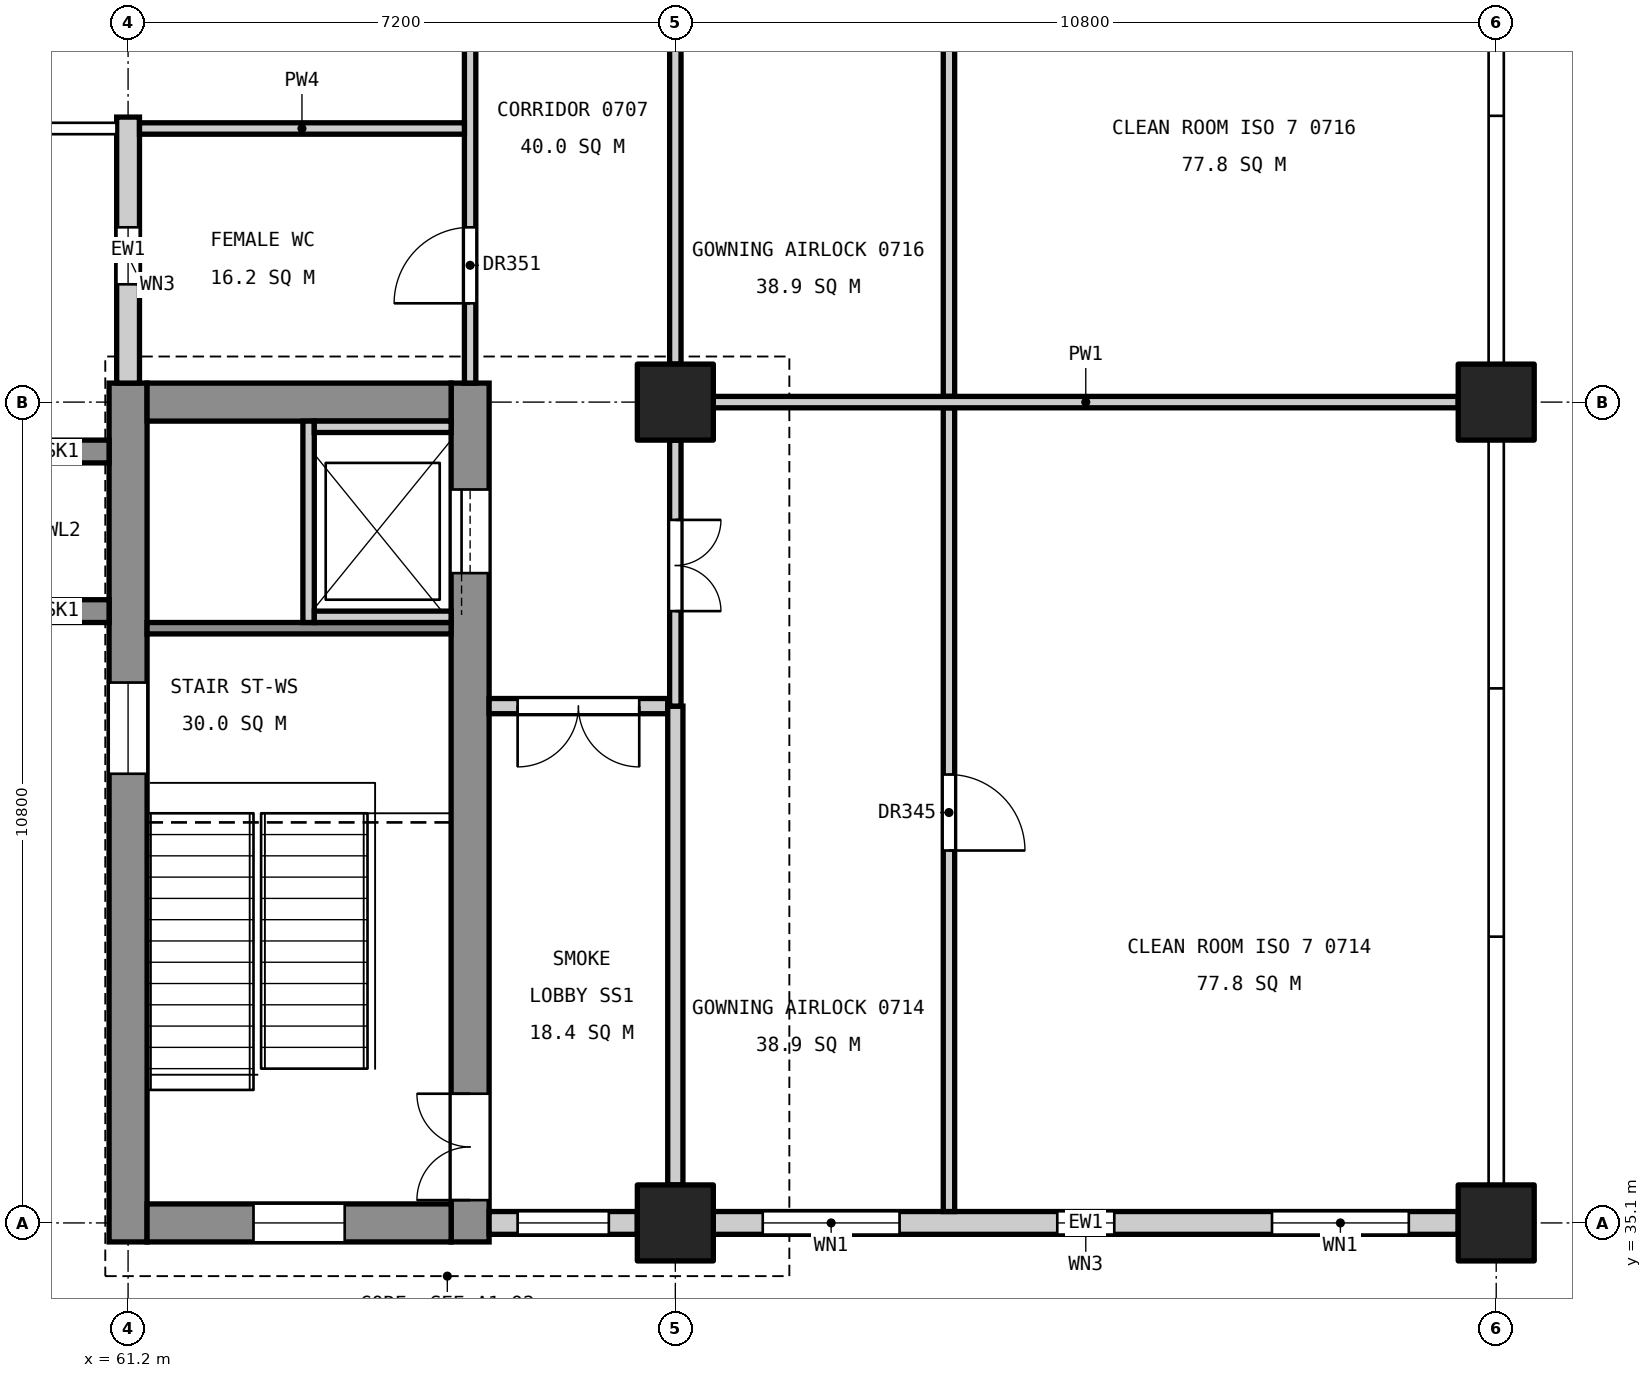
"""IFC4 building model, lengths in metres.
Left out: names, types, materials, properties, quantities, classifications, styles, units other than length and angle.
Written with IfcOpenShell. Run it as: python <this file> out.ifc"""

import sys

from ifc_helpers import new_model, si_unit, direction, frame, frame_2d, origin, origin_2d, place, context, subcontext, project, spatial, rectangle, extrude, element, fill, save


model = new_model("IFC4")
c1 = context("Model", 3, precision=1e-05, world=origin(), true_north=direction((0.0, 1.0)))
c2 = subcontext(c1, "Body", "Model", "MODEL_VIEW")
j1 = project(units=[si_unit("LENGTHUNIT", "METRE"), si_unit("PLANEANGLEUNIT", "RADIAN")], contexts=[c1])
p1 = place(None, origin())
s1 = spatial("IfcSite", under=j1, at=p1, CompositionType="ELEMENT")
p2 = place(p1, origin())
s2 = spatial("IfcBuilding", under=s1, at=p2, CompositionType="ELEMENT")
p3 = place(p2, frame((0.0, 0.0, 36.6)))
s3 = spatial("IfcBuildingStorey", under=s2, at=p3, CompositionType="ELEMENT", Elevation=36.6)
for number, where, z_axis, x_axis in (
    (1, (68.4, 35.1, 0.0), (0.0, 0.0, 1.0), (1.0, 0.0, 0.0)),
    (2, (68.4, 45.9, 0.0), (0.0, 0.0, 1.0), (1.0, 0.0, 0.0)),
    (3, (79.2, 35.1, 0.0), (0.0, 0.0, 1.0), (1.0, 0.0, 0.0)),
    (4, (79.2, 45.9, 0.0), (0.0, 0.0, 1.0), (1.0, 0.0, 0.0)),
):
    element("IfcColumn", number, at=place(p3, frame(where, z_axis=z_axis, x_axis=x_axis)), inside=s3, PredefinedType="COLUMN", context=c2, shape_type="SweptSolid", body=[
        extrude(rectangle(XDim=1.0, YDim=1.0, at=origin_2d()), origin(), (0.0, 0.0, 1.0), 4.8),
    ])
p4 = place(p3, frame((61.2, 34.85, 0.0), z_axis=(0.0, 0.0, 1.0), x_axis=(0.0, 1.0, 0.0)))
e5 = element("IfcWall", 5, at=p4, inside=s3, PredefinedType="SHEAR", context=c2, shape_type="SweptSolid", body=[
    extrude(rectangle(XDim=11.3, YDim=0.5, at=frame_2d((5.65, 0.0))), origin(), (0.0, 0.0, 1.0), 4.55),
])
p5 = place(p4, frame((6.16, 0.0, 3.4)))
e6 = element("IfcOpeningElement", 6, at=p5, cuts=e5, PredefinedType="OPENING", context=c2, shape_type="SweptSolid", body=[
    extrude(rectangle(XDim=1.2, YDim=0.9, at=frame_2d((0.6, 0.45))), frame((0.0, 0.26, 0.0), z_axis=(0.0, -1.0, 0.0), x_axis=(1.0, 0.0, 0.0)), (0.0, 0.0, 1.0), 0.52),
])
p6 = place(p3, frame((65.7, 34.85, 0.0), z_axis=(0.0, 0.0, 1.0), x_axis=(0.0, 1.0, 0.0)))
e7 = element("IfcWall", 7, at=p6, inside=s3, PredefinedType="SHEAR", context=c2, shape_type="SweptSolid", body=[
    extrude(rectangle(XDim=11.3, YDim=0.5, at=frame_2d((5.65, 0.0))), origin(), (0.0, 0.0, 1.0), 4.55),
])
p7 = place(p6, frame((0.55, 0.0, 0.0)))
e8 = element("IfcOpeningElement", 8, at=p7, cuts=e7, PredefinedType="OPENING", context=c2, shape_type="SweptSolid", body=[
    extrude(rectangle(XDim=1.4, YDim=2.1, at=frame_2d((0.7, 1.05))), frame((0.0, 0.26, 0.0), z_axis=(0.0, -1.0, 0.0), x_axis=(1.0, 0.0, 0.0)), (0.0, 0.0, 1.0), 0.52),
])
p8 = place(p6, frame((8.8, 0.0, 0.0)))
e9 = element("IfcOpeningElement", 9, at=p8, cuts=e7, PredefinedType="OPENING", context=c2, shape_type="SweptSolid", body=[
    extrude(rectangle(XDim=1.1, YDim=2.1, at=frame_2d((0.55, 1.05))), frame((0.0, 0.26, 0.0), z_axis=(0.0, -1.0, 0.0), x_axis=(1.0, 0.0, 0.0)), (0.0, 0.0, 1.0), 0.52),
])
p9 = place(p3, frame((61.45, 35.1, 0.0), z_axis=(0.0, 0.0, 1.0), x_axis=(1.0, 0.0, 0.0)))
e10 = element("IfcWall", 10, at=p9, inside=s3, PredefinedType="SHEAR", context=c2, shape_type="SweptSolid", body=[
    extrude(rectangle(XDim=4.0, YDim=0.5, at=frame_2d((2.0, 0.0))), origin(), (0.0, 0.0, 1.0), 4.55),
])
p10 = place(p9, frame((1.4, 0.0, 3.4)))
e11 = element("IfcOpeningElement", 11, at=p10, cuts=e10, PredefinedType="OPENING", context=c2, shape_type="SweptSolid", body=[
    extrude(rectangle(XDim=1.2, YDim=0.9, at=frame_2d((0.6, 0.45))), frame((0.0, 0.26, 0.0), z_axis=(0.0, -1.0, 0.0), x_axis=(1.0, 0.0, 0.0)), (0.0, 0.0, 1.0), 0.52),
])
p11 = place(p3, frame((61.45, 45.9, 0.0), z_axis=(0.0, 0.0, 1.0), x_axis=(1.0, 0.0, 0.0)))
e12 = element("IfcWall", 12, at=p11, inside=s3, PredefinedType="SHEAR", context=c2, shape_type="SweptSolid", body=[
    extrude(rectangle(XDim=4.0, YDim=0.5, at=frame_2d((2.0, 0.0))), origin(), (0.0, 0.0, 1.0), 4.55),
])
for number, where, z_axis, x_axis in (
    (13, (60.95, 43.15, 0.0), (0.0, 0.0, 1.0), (-1.0, 0.0, 0.0)),
    (14, (60.95, 45.25, 0.0), (0.0, 0.0, 1.0), (-1.0, 0.0, 0.0)),
):
    element("IfcWall", number, at=place(p3, frame(where, z_axis=z_axis, x_axis=x_axis)), inside=s3, PredefinedType="SHEAR", context=c2, shape_type="SweptSolid", body=[
        extrude(rectangle(XDim=1.25, YDim=0.3, at=frame_2d((0.625, 0.0))), origin(), (0.0, 0.0, 1.0), 4.8),
    ])
p12 = place(p3, frame((61.45, 42.925, 0.0), z_axis=(0.0, 0.0, 1.0), x_axis=(1.0, 0.0, 0.0)))
e15 = element("IfcWall", 15, at=p12, inside=s3, PredefinedType="SOLIDWALL", context=c2, shape_type="SweptSolid", body=[
    extrude(rectangle(XDim=4.0, YDim=0.15, at=frame_2d((2.0, 0.0))), origin(), (0.0, 0.0, 1.0), 4.55),
])
p13 = place(p3, frame((63.575, 43.0, 0.0), z_axis=(0.0, 0.0, 1.0), x_axis=(0.0, 1.0, 0.0)))
e16 = element("IfcWall", 16, at=p13, inside=s3, PredefinedType="SOLIDWALL", context=c2, shape_type="SweptSolid", body=[
    extrude(rectangle(XDim=2.65, YDim=0.15, at=frame_2d((1.325, 0.0))), origin(), (0.0, 0.0, 1.0), 4.8),
])
for number, where, z_axis, x_axis in (
    (17, (63.65, 43.075, 0.0), (0.0, 0.0, 1.0), (1.0, 0.0, 0.0)),
    (18, (63.65, 45.575, 0.0), (0.0, 0.0, 1.0), (1.0, 0.0, 0.0)),
):
    element("IfcWall", number, at=place(p3, frame(where, z_axis=z_axis, x_axis=x_axis)), inside=s3, PredefinedType="SOLIDWALL", context=c2, shape_type="SweptSolid", body=[
        extrude(rectangle(XDim=1.8, YDim=0.15, at=frame_2d((0.9, 0.0))), origin(), (0.0, 0.0, 1.0), 4.8),
    ])
p14 = place(p3, frame((61.2, 46.15, 0.0), z_axis=(0.0, 0.0, 1.0), x_axis=(0.0, 1.0, 0.0)))
e19 = element("IfcWall", 19, at=p14, inside=s3, PredefinedType="STANDARD", context=c2, shape_type="SweptSolid", body=[
    extrude(rectangle(XDim=3.5, YDim=0.3, at=frame_2d((1.75, 0.0))), origin(), (0.0, 0.0, 1.0), 3.65),
])
p15 = place(p14, frame((1.3, 0.0, 0.8)))
e20 = element("IfcOpeningElement", 20, at=p15, cuts=e19, PredefinedType="OPENING", context=c2, shape_type="SweptSolid", body=[
    extrude(rectangle(XDim=0.75, YDim=1.2, at=frame_2d((0.375, 0.6))), frame((0.0, 0.16, 0.0), z_axis=(0.0, -1.0, 0.0), x_axis=(1.0, 0.0, 0.0)), (0.0, 0.0, 1.0), 0.32),
])
p16 = place(p3, frame((65.95, 35.1, 0.0), z_axis=(0.0, 0.0, 1.0), x_axis=(1.0, 0.0, 0.0)))
e21 = element("IfcWall", 21, at=p16, inside=s3, PredefinedType="STANDARD", context=c2, shape_type="SweptSolid", body=[
    extrude(rectangle(XDim=1.95, YDim=0.3, at=frame_2d((0.975, 0.0))), origin(), (0.0, 0.0, 1.0), 3.85),
])
p17 = place(p16, frame((0.375, 0.0, 0.9)))
e22 = element("IfcOpeningElement", 22, at=p17, cuts=e21, PredefinedType="OPENING", context=c2, shape_type="SweptSolid", body=[
    extrude(rectangle(XDim=1.2, YDim=2.4, at=frame_2d((0.6, 1.2))), frame((0.0, 0.16, 0.0), z_axis=(0.0, -1.0, 0.0), x_axis=(1.0, 0.0, 0.0)), (0.0, 0.0, 1.0), 0.32),
])
p18 = place(p3, frame((68.9, 35.1, 0.0), z_axis=(0.0, 0.0, 1.0), x_axis=(1.0, 0.0, 0.0)))
e23 = element("IfcWall", 23, at=p18, inside=s3, PredefinedType="STANDARD", context=c2, shape_type="SweptSolid", body=[
    extrude(rectangle(XDim=9.8, YDim=0.3, at=frame_2d((4.9, 0.0))), origin(), (0.0, 0.0, 1.0), 3.85),
])
p19 = place(p18, frame((0.65, 0.0, 0.9)))
e24 = element("IfcOpeningElement", 24, at=p19, cuts=e23, PredefinedType="OPENING", context=c2, shape_type="SweptSolid", body=[
    extrude(rectangle(XDim=1.8, YDim=2.4, at=frame_2d((0.9, 1.2))), frame((0.0, 0.16, 0.0), z_axis=(0.0, -1.0, 0.0), x_axis=(1.0, 0.0, 0.0)), (0.0, 0.0, 1.0), 0.32),
])
p20 = place(p18, frame((4.525, 0.0, 0.8)))
e25 = element("IfcOpeningElement", 25, at=p20, cuts=e23, PredefinedType="OPENING", context=c2, shape_type="SweptSolid", body=[
    extrude(rectangle(XDim=0.75, YDim=1.2, at=frame_2d((0.375, 0.6))), frame((0.0, 0.16, 0.0), z_axis=(0.0, -1.0, 0.0), x_axis=(1.0, 0.0, 0.0)), (0.0, 0.0, 1.0), 0.32),
])
p21 = place(p18, frame((7.35, 0.0, 0.9)))
e26 = element("IfcOpeningElement", 26, at=p21, cuts=e23, PredefinedType="OPENING", context=c2, shape_type="SweptSolid", body=[
    extrude(rectangle(XDim=1.8, YDim=2.4, at=frame_2d((0.9, 1.2))), frame((0.0, 0.16, 0.0), z_axis=(0.0, -1.0, 0.0), x_axis=(1.0, 0.0, 0.0)), (0.0, 0.0, 1.0), 0.32),
])
p22 = place(p3, frame((65.7, 46.15, 0.0), z_axis=(0.0, 0.0, 1.0), x_axis=(0.0, 1.0, 0.0)))
e27 = element("IfcWall", 27, at=p22, inside=s3, PredefinedType="PARTITIONING", context=c2, shape_type="SweptSolid", body=[
    extrude(rectangle(XDim=10.4, YDim=0.15, at=frame_2d((5.2, 0.0))), origin(), (0.0, 0.0, 1.0), 3.55),
])
p23 = place(p22, frame((1.05, 0.0, 0.0)))
e28 = element("IfcOpeningElement", 28, at=p23, cuts=e27, PredefinedType="OPENING", context=c2, shape_type="SweptSolid", body=[
    extrude(rectangle(XDim=1.0, YDim=2.1, at=frame_2d((0.5, 1.05))), frame((0.0, 0.085, 0.0), z_axis=(0.0, -1.0, 0.0), x_axis=(1.0, 0.0, 0.0)), (0.0, 0.0, 1.0), 0.17),
])
p24 = place(p22, frame((6.45, 0.0, 0.0)))
e29 = element("IfcOpeningElement", 29, at=p24, cuts=e27, PredefinedType="OPENING", context=c2, shape_type="SweptSolid", body=[
    extrude(rectangle(XDim=1.0, YDim=2.1, at=frame_2d((0.5, 1.05))), frame((0.0, 0.085, 0.0), z_axis=(0.0, -1.0, 0.0), x_axis=(1.0, 0.0, 0.0)), (0.0, 0.0, 1.0), 0.17),
])
p25 = place(p3, frame((61.35, 49.5, 0.0), z_axis=(0.0, 0.0, 1.0), x_axis=(1.0, 0.0, 0.0)))
e30 = element("IfcWall", 30, at=p25, inside=s3, PredefinedType="PARTITIONING", context=c2, shape_type="SweptSolid", body=[
    extrude(rectangle(XDim=4.275, YDim=0.15, at=frame_2d((2.137, 0.0))), origin(), (0.0, 0.0, 1.0), 3.85),
])
p26 = place(p3, frame((65.95, 41.9, 0.0), z_axis=(0.0, 0.0, 1.0), x_axis=(1.0, 0.0, 0.0)))
e31 = element("IfcWall", 31, at=p26, inside=s3, PredefinedType="PARTITIONING", context=c2, shape_type="SweptSolid", body=[
    extrude(rectangle(XDim=2.35, YDim=0.2, at=frame_2d((1.175, 0.0))), origin(), (0.0, 0.0, 1.0), 3.55),
])
p27 = place(p26, frame((0.375, 0.0, 0.0)))
e32 = element("IfcOpeningElement", 32, at=p27, cuts=e31, PredefinedType="OPENING", context=c2, shape_type="SweptSolid", body=[
    extrude(rectangle(XDim=1.6, YDim=2.1, at=frame_2d((0.8, 1.05))), frame((0.0, 0.11, 0.0), z_axis=(0.0, -1.0, 0.0), x_axis=(1.0, 0.0, 0.0)), (0.0, 0.0, 1.0), 0.22),
])
p28 = place(p3, frame((68.4, 35.6, 0.0), z_axis=(0.0, 0.0, 1.0), x_axis=(0.0, 1.0, 0.0)))
e33 = element("IfcWall", 33, at=p28, inside=s3, PredefinedType="PARTITIONING", context=c2, shape_type="SweptSolid", body=[
    extrude(rectangle(XDim=6.3, YDim=0.2, at=frame_2d((3.15, 0.0))), origin(), (0.0, 0.0, 1.0), 3.55),
])
p29 = place(p3, frame((68.4, 41.9, 0.0), z_axis=(0.0, 0.0, 1.0), x_axis=(0.0, 1.0, 0.0)))
e34 = element("IfcWall", 34, at=p29, inside=s3, PredefinedType="PARTITIONING", context=c2, shape_type="SweptSolid", body=[
    extrude(rectangle(XDim=3.5, YDim=0.15, at=frame_2d((1.75, 0.0))), origin(), (0.0, 0.0, 1.0), 3.55),
])
p30 = place(p29, frame((1.25, 0.0, 0.0)))
e35 = element("IfcOpeningElement", 35, at=p30, cuts=e34, PredefinedType="OPENING", context=c2, shape_type="SweptSolid", body=[
    extrude(rectangle(XDim=1.2, YDim=2.1, at=frame_2d((0.6, 1.05))), frame((0.0, 0.085, 0.0), z_axis=(0.0, -1.0, 0.0), x_axis=(1.0, 0.0, 0.0)), (0.0, 0.0, 1.0), 0.17),
])
p31 = place(p3, frame((68.4, 46.4, 0.0), z_axis=(0.0, 0.0, 1.0), x_axis=(0.0, 1.0, 0.0)))
e36 = element("IfcWall", 36, at=p31, inside=s3, PredefinedType="PARTITIONING", context=c2, shape_type="SweptSolid", body=[
    extrude(rectangle(XDim=9.8, YDim=0.15, at=frame_2d((4.9, 0.0))), origin(), (0.0, 0.0, 1.0), 3.55),
])
p32 = place(p31, frame((4.4, 0.0, 0.0)))
e37 = element("IfcOpeningElement", 37, at=p32, cuts=e36, PredefinedType="OPENING", context=c2, shape_type="SweptSolid", body=[
    extrude(rectangle(XDim=1.2, YDim=2.1, at=frame_2d((0.6, 1.05))), frame((0.0, 0.085, 0.0), z_axis=(0.0, -1.0, 0.0), x_axis=(1.0, 0.0, 0.0)), (0.0, 0.0, 1.0), 0.17),
])
p33 = place(p3, frame((72.0, 35.25, 0.0), z_axis=(0.0, 0.0, 1.0), x_axis=(0.0, 1.0, 0.0)))
e38 = element("IfcWall", 38, at=p33, inside=s3, PredefinedType="PARTITIONING", context=c2, shape_type="SweptSolid", body=[
    extrude(rectangle(XDim=10.575, YDim=0.15, at=frame_2d((5.288, 0.0))), origin(), (0.0, 0.0, 1.0), 3.55),
])
p34 = place(p33, frame((4.75, 0.0, 0.0)))
e39 = element("IfcOpeningElement", 39, at=p34, cuts=e38, PredefinedType="OPENING", context=c2, shape_type="SweptSolid", body=[
    extrude(rectangle(XDim=1.0, YDim=2.1, at=frame_2d((0.5, 1.05))), frame((0.0, 0.085, 0.0), z_axis=(0.0, -1.0, 0.0), x_axis=(1.0, 0.0, 0.0)), (0.0, 0.0, 1.0), 0.17),
])
p35 = place(p3, frame((72.0, 45.975, 0.0), z_axis=(0.0, 0.0, 1.0), x_axis=(0.0, 1.0, 0.0)))
e40 = element("IfcWall", 40, at=p35, inside=s3, PredefinedType="PARTITIONING", context=c2, shape_type="SweptSolid", body=[
    extrude(rectangle(XDim=10.575, YDim=0.15, at=frame_2d((5.288, 0.0))), origin(), (0.0, 0.0, 1.0), 3.55),
])
p36 = place(p35, frame((4.825, 0.0, 0.0)))
e41 = element("IfcOpeningElement", 41, at=p36, cuts=e40, PredefinedType="OPENING", context=c2, shape_type="SweptSolid", body=[
    extrude(rectangle(XDim=1.0, YDim=2.1, at=frame_2d((0.5, 1.05))), frame((0.0, 0.085, 0.0), z_axis=(0.0, -1.0, 0.0), x_axis=(1.0, 0.0, 0.0)), (0.0, 0.0, 1.0), 0.17),
])
p37 = place(p3, frame((68.9, 45.9, 0.0), z_axis=(0.0, 0.0, 1.0), x_axis=(1.0, 0.0, 0.0)))
e42 = element("IfcWall", 42, at=p37, inside=s3, PredefinedType="PARTITIONING", context=c2, shape_type="SweptSolid", body=[
    extrude(rectangle(XDim=9.8, YDim=0.15, at=frame_2d((4.9, 0.0))), origin(), (0.0, 0.0, 1.0), 3.85),
])
p38 = place(p7, origin())
e43 = element("IfcDoor", 43, at=p38, inside=s3, OperationType="DOUBLE_DOOR_SINGLE_SWING", PredefinedType="DOOR", context=c2, shape_type="SweptSolid", body=[
    extrude(rectangle(XDim=1.4, YDim=2.1, at=frame_2d((0.7, 1.05))), frame((0.0, 0.025, 0.0), z_axis=(0.0, -1.0, 0.0), x_axis=(1.0, 0.0, 0.0)), (0.0, 0.0, 1.0), 0.05),
])
fill(e8, e43)
p39 = place(p8, origin())
e44 = element("IfcDoor", 44, at=p39, inside=s3, OperationType="SLIDING_TO_LEFT", PredefinedType="DOOR", context=c2, shape_type="SweptSolid", body=[
    extrude(rectangle(XDim=1.1, YDim=2.1, at=frame_2d((0.55, 1.05))), frame((0.0, 0.025, 0.0), z_axis=(0.0, -1.0, 0.0), x_axis=(1.0, 0.0, 0.0)), (0.0, 0.0, 1.0), 0.05),
])
fill(e9, e44)
p40 = place(p15, origin())
e45 = element("IfcWindow", 45, at=p40, inside=s3, PartitioningType="SINGLE_PANEL", PredefinedType="WINDOW", context=c2, shape_type="SweptSolid", body=[
    extrude(rectangle(XDim=0.75, YDim=1.2, at=frame_2d((0.375, 0.6))), frame((0.0, 0.03, 0.0), z_axis=(0.0, -1.0, 0.0), x_axis=(1.0, 0.0, 0.0)), (0.0, 0.0, 1.0), 0.06),
])
fill(e20, e45)
p41 = place(p17, origin())
e46 = element("IfcWindow", 46, at=p41, inside=s3, PartitioningType="SINGLE_PANEL", PredefinedType="WINDOW", context=c2, shape_type="SweptSolid", body=[
    extrude(rectangle(XDim=1.2, YDim=2.4, at=frame_2d((0.6, 1.2))), frame((0.0, 0.03, 0.0), z_axis=(0.0, -1.0, 0.0), x_axis=(1.0, 0.0, 0.0)), (0.0, 0.0, 1.0), 0.06),
])
fill(e22, e46)
p42 = place(p19, origin())
e47 = element("IfcWindow", 47, at=p42, inside=s3, PartitioningType="SINGLE_PANEL", PredefinedType="WINDOW", context=c2, shape_type="SweptSolid", body=[
    extrude(rectangle(XDim=1.8, YDim=2.4, at=frame_2d((0.9, 1.2))), frame((0.0, 0.03, 0.0), z_axis=(0.0, -1.0, 0.0), x_axis=(1.0, 0.0, 0.0)), (0.0, 0.0, 1.0), 0.06),
])
fill(e24, e47)
p43 = place(p20, origin())
e48 = element("IfcWindow", 48, at=p43, inside=s3, PartitioningType="SINGLE_PANEL", PredefinedType="WINDOW", context=c2, shape_type="SweptSolid", body=[
    extrude(rectangle(XDim=0.75, YDim=1.2, at=frame_2d((0.375, 0.6))), frame((0.0, 0.03, 0.0), z_axis=(0.0, -1.0, 0.0), x_axis=(1.0, 0.0, 0.0)), (0.0, 0.0, 1.0), 0.06),
])
fill(e25, e48)
p44 = place(p21, origin())
e49 = element("IfcWindow", 49, at=p44, inside=s3, PartitioningType="SINGLE_PANEL", PredefinedType="WINDOW", context=c2, shape_type="SweptSolid", body=[
    extrude(rectangle(XDim=1.8, YDim=2.4, at=frame_2d((0.9, 1.2))), frame((0.0, 0.03, 0.0), z_axis=(0.0, -1.0, 0.0), x_axis=(1.0, 0.0, 0.0)), (0.0, 0.0, 1.0), 0.06),
])
fill(e26, e49)
p45 = place(p5, origin())
e50 = element("IfcWindow", 50, at=p45, inside=s3, PartitioningType="SINGLE_PANEL", PredefinedType="WINDOW", context=c2, shape_type="SweptSolid", body=[
    extrude(rectangle(XDim=1.2, YDim=0.9, at=frame_2d((0.6, 0.45))), frame((0.0, 0.03, 0.0), z_axis=(0.0, -1.0, 0.0), x_axis=(1.0, 0.0, 0.0)), (0.0, 0.0, 1.0), 0.06),
])
fill(e6, e50)
p46 = place(p10, origin())
e51 = element("IfcWindow", 51, at=p46, inside=s3, PartitioningType="SINGLE_PANEL", PredefinedType="WINDOW", context=c2, shape_type="SweptSolid", body=[
    extrude(rectangle(XDim=1.2, YDim=0.9, at=frame_2d((0.6, 0.45))), frame((0.0, 0.03, 0.0), z_axis=(0.0, -1.0, 0.0), x_axis=(1.0, 0.0, 0.0)), (0.0, 0.0, 1.0), 0.06),
])
fill(e11, e51)
p47 = place(p34, frame((1.0, 0.0, 0.0), z_axis=(0.0, 0.0, 1.0), x_axis=(-1.0, 0.0, 0.0)))
e52 = element("IfcDoor", 52, at=p47, inside=s3, OperationType="SINGLE_SWING_RIGHT", PredefinedType="DOOR", context=c2, shape_type="SweptSolid", body=[
    extrude(rectangle(XDim=1.0, YDim=2.1, at=frame_2d((0.5, 1.05))), frame((0.0, 0.025, 0.0), z_axis=(0.0, -1.0, 0.0), x_axis=(1.0, 0.0, 0.0)), (0.0, 0.0, 1.0), 0.05),
])
fill(e39, e52)
p48 = place(p23, origin())
e53 = element("IfcDoor", 53, at=p48, inside=s3, OperationType="SINGLE_SWING_LEFT", PredefinedType="DOOR", context=c2, shape_type="SweptSolid", body=[
    extrude(rectangle(XDim=1.0, YDim=2.1, at=frame_2d((0.5, 1.05))), frame((0.0, 0.025, 0.0), z_axis=(0.0, -1.0, 0.0), x_axis=(1.0, 0.0, 0.0)), (0.0, 0.0, 1.0), 0.05),
])
fill(e28, e53)
p49 = place(p30, frame((1.2, 0.0, 0.0), z_axis=(0.0, 0.0, 1.0), x_axis=(-1.0, 0.0, 0.0)))
e54 = element("IfcDoor", 54, at=p49, inside=s3, OperationType="DOUBLE_DOOR_SINGLE_SWING", PredefinedType="DOOR", context=c2, shape_type="SweptSolid", body=[
    extrude(rectangle(XDim=1.2, YDim=2.1, at=frame_2d((0.6, 1.05))), frame((0.0, 0.025, 0.0), z_axis=(0.0, -1.0, 0.0), x_axis=(1.0, 0.0, 0.0)), (0.0, 0.0, 1.0), 0.05),
])
fill(e35, e54)
p50 = place(p27, frame((1.6, 0.0, 0.0), z_axis=(0.0, 0.0, 1.0), x_axis=(-1.0, 0.0, 0.0)))
e55 = element("IfcDoor", 55, at=p50, inside=s3, OperationType="DOUBLE_DOOR_SINGLE_SWING", PredefinedType="DOOR", context=c2, shape_type="SweptSolid", body=[
    extrude(rectangle(XDim=1.6, YDim=2.1, at=frame_2d((0.8, 1.05))), frame((0.0, 0.025, 0.0), z_axis=(0.0, -1.0, 0.0), x_axis=(1.0, 0.0, 0.0)), (0.0, 0.0, 1.0), 0.05),
])
fill(e32, e55)
save(model, sys.argv[1])
